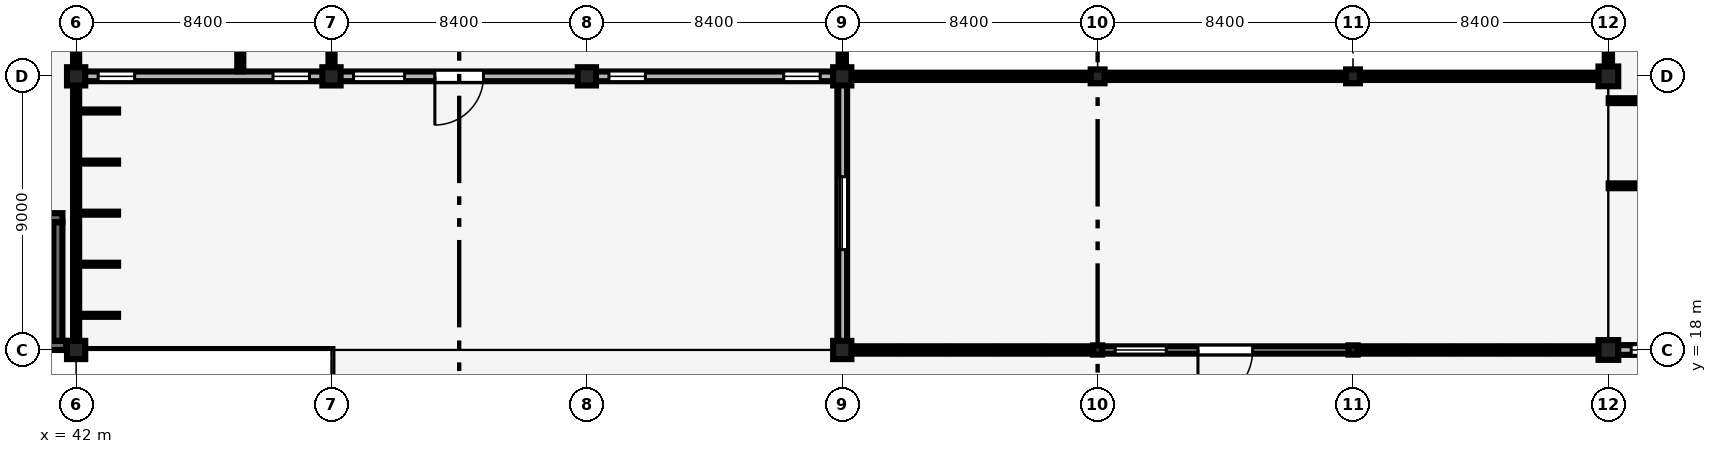
"""IFC4 building model, lengths in metres.
Left out: names, types, materials, properties, quantities, classifications, styles, units other than length and angle.
Written with IfcOpenShell. Run it as: python <this file> out.ifc"""

import sys

from ifc_helpers import new_model, si_unit, direction, frame, frame_2d, origin, origin_2d, place, context, subcontext, project, spatial, rectangle, hollow_rectangle, hollow_circle, extrude, element, fill, save


model = new_model("IFC4")
c1 = context("Model", 3, precision=1e-05, world=origin(), true_north=direction((0.0, 1.0)))
c2 = subcontext(c1, "Body", "Model", "MODEL_VIEW")
j1 = project(units=[si_unit("LENGTHUNIT", "METRE"), si_unit("PLANEANGLEUNIT", "RADIAN")], contexts=[c1])
p1 = place(None, origin())
s1 = spatial("IfcSite", under=j1, at=p1, CompositionType="ELEMENT")
p2 = place(p1, origin())
s2 = spatial("IfcBuilding", under=s1, at=p2, CompositionType="ELEMENT")
p3 = place(p2, frame((0.0, 0.0, 4.8)))
s3 = spatial("IfcBuildingStorey", under=s2, at=p3, CompositionType="ELEMENT", Elevation=4.8)
for number, where, z_axis, x_axis in (
    (1, (42.0, 18.0, 0.0), (0.0, 0.0, 1.0), (1.0, 0.0, 0.0)),
    (2, (42.0, 27.0, 0.0), (0.0, 0.0, 1.0), (1.0, 0.0, 0.0)),
    (3, (50.4, 27.0, 0.0), (0.0, 0.0, 1.0), (1.0, 0.0, 0.0)),
    (4, (58.8, 27.0, 0.0), (0.0, 0.0, 1.0), (1.0, 0.0, 0.0)),
    (5, (67.2, 18.0, 0.0), (0.0, 0.0, 1.0), (1.0, 0.0, 0.0)),
    (6, (67.2, 27.0, 0.0), (0.0, 0.0, 1.0), (1.0, 0.0, 0.0)),
):
    element("IfcColumn", number, at=place(p3, frame(where, z_axis=z_axis, x_axis=x_axis)), inside=s3, PredefinedType="COLUMN", context=c2, shape_type="SweptSolid", body=[
        extrude(rectangle(XDim=0.6, YDim=0.6, at=origin_2d()), origin(), (0.0, 0.0, 1.0), 4.2),
    ])
for number, where, z_axis, x_axis in (
    (7, (75.6, 18.0, 0.0), (0.0, 0.0, 1.0), (1.0, 0.0, 0.0)),
    (8, (84.0, 18.0, 0.0), (0.0, 0.0, 1.0), (1.0, 0.0, 0.0)),
):
    element("IfcColumn", number, at=place(p3, frame(where, z_axis=z_axis, x_axis=x_axis)), inside=s3, PredefinedType="COLUMN", context=c2, shape_type="SweptSolid", body=[
        extrude(hollow_rectangle(XDim=0.305, YDim=0.305, WallThickness=0.012, InnerFilletRadius=0.012, OuterFilletRadius=0.024, at=origin_2d()), origin(), (0.0, 0.0, 1.0), 4.2),
    ])
for number, where, z_axis, x_axis in (
    (9, (92.4, 18.0, 0.0), (0.0, 0.0, 1.0), (1.0, 0.0, 0.0)),
    (10, (92.4, 27.0, 0.0), (0.0, 0.0, 1.0), (1.0, 0.0, 0.0)),
):
    element("IfcColumn", number, at=place(p3, frame(where, z_axis=z_axis, x_axis=x_axis)), inside=s3, PredefinedType="COLUMN", context=c2, shape_type="SweptSolid", body=[
        extrude(rectangle(XDim=0.65, YDim=0.65, at=origin_2d()), origin(), (0.0, 0.0, 1.0), 4.2),
    ])
for number, where, z_axis, x_axis in (
    (11, (75.6, 27.0, 0.0), (0.0, 0.0, 1.0), (1.0, 0.0, 0.0)),
    (12, (84.0, 27.0, 0.0), (0.0, 0.0, 1.0), (1.0, 0.0, 0.0)),
):
    element("IfcColumn", number, at=place(p3, frame(where, z_axis=z_axis, x_axis=x_axis)), inside=s3, PredefinedType="USERDEFINED", context=c2, shape_type="SweptSolid", body=[
        extrude(hollow_circle(Radius=0.229, WallThickness=0.013, at=origin_2d()), origin(), (0.0, 0.0, 1.0), 4.2),
    ])
p4 = place(p3, frame((92.7, 18.0, 0.0), z_axis=(0.0, 0.0, 1.0), x_axis=(1.0, 0.0, 0.0)))
e13 = element("IfcWall", 13, at=p4, inside=s3, PredefinedType="SOLIDWALL", context=c2, shape_type="SweptSolid", body=[
    extrude(rectangle(XDim=7.8, YDim=0.32, at=frame_2d((3.9, 0.0))), origin(), (0.0, 0.0, 1.0), 3.15),
])
p5 = place(p4, frame((4.8, 0.0, 0.0), z_axis=(0.0, 0.0, 1.0), x_axis=(-1.0, 0.0, 0.0)))
e14 = element("IfcOpeningElement", 14, at=p5, cuts=e13, PredefinedType="OPENING", context=c2, shape_type="SweptSolid", body=[
    extrude(rectangle(XDim=1.8, YDim=2.3, at=frame_2d((0.9, 1.15))), frame((0.0, 0.17, 0.0), z_axis=(0.0, -1.0, 0.0), x_axis=(1.0, 0.0, 0.0)), (0.0, 0.0, 1.0), 0.34),
])
p6 = place(p4, frame((0.45, 0.0, 0.95)))
e15 = element("IfcOpeningElement", 15, at=p6, cuts=e13, PredefinedType="OPENING", context=c2, shape_type="SweptSolid", body=[
    extrude(rectangle(XDim=1.68, YDim=1.8, at=frame_2d((0.84, 0.9))), frame((0.0, 0.17, 0.0), z_axis=(0.0, -1.0, 0.0), x_axis=(1.0, 0.0, 0.0)), (0.0, 0.0, 1.0), 0.34),
])
p7 = place(p3, frame((42.275, 27.0, 0.0), z_axis=(0.0, 0.0, 1.0), x_axis=(1.0, 0.0, 0.0)))
e16 = element("IfcWall", 16, at=p7, inside=s3, PredefinedType="SOLIDWALL", context=c2, shape_type="SweptSolid", body=[
    extrude(rectangle(XDim=7.85, YDim=0.32, at=frame_2d((3.925, 0.0))), origin(), (0.0, 0.0, 1.0), 3.13),
])
p8 = place(p7, frame((0.45, 0.0, 0.9)))
e17 = element("IfcOpeningElement", 17, at=p8, cuts=e16, PredefinedType="OPENING", context=c2, shape_type="SweptSolid", body=[
    extrude(rectangle(XDim=1.2, YDim=1.5, at=frame_2d((0.6, 0.75))), frame((0.0, 0.17, 0.0), z_axis=(0.0, -1.0, 0.0), x_axis=(1.0, 0.0, 0.0)), (0.0, 0.0, 1.0), 0.34),
])
p9 = place(p7, frame((6.2, 0.0, 0.9)))
e18 = element("IfcOpeningElement", 18, at=p9, cuts=e16, PredefinedType="OPENING", context=c2, shape_type="SweptSolid", body=[
    extrude(rectangle(XDim=1.2, YDim=1.8, at=frame_2d((0.6, 0.9))), frame((0.0, 0.17, 0.0), z_axis=(0.0, -1.0, 0.0), x_axis=(1.0, 0.0, 0.0)), (0.0, 0.0, 1.0), 0.34),
])
p10 = place(p3, frame((50.675, 27.0, 0.0), z_axis=(0.0, 0.0, 1.0), x_axis=(1.0, 0.0, 0.0)))
e19 = element("IfcWall", 19, at=p10, inside=s3, PredefinedType="SOLIDWALL", context=c2, shape_type="SweptSolid", body=[
    extrude(rectangle(XDim=7.85, YDim=0.32, at=frame_2d((3.925, 0.0))), origin(), (0.0, 0.0, 1.0), 3.08),
])
p11 = place(p10, frame((4.725, 0.0, 0.0), z_axis=(0.0, 0.0, 1.0), x_axis=(-1.0, 0.0, 0.0)))
e20 = element("IfcOpeningElement", 20, at=p11, cuts=e19, PredefinedType="OPENING", context=c2, shape_type="SweptSolid", body=[
    extrude(rectangle(XDim=1.6, YDim=2.3, at=frame_2d((0.8, 1.15))), frame((0.0, 0.17, 0.0), z_axis=(0.0, -1.0, 0.0), x_axis=(1.0, 0.0, 0.0)), (0.0, 0.0, 1.0), 0.34),
])
p12 = place(p10, frame((0.45, 0.0, 0.95)))
e21 = element("IfcOpeningElement", 21, at=p12, cuts=e19, PredefinedType="OPENING", context=c2, shape_type="SweptSolid", body=[
    extrude(rectangle(XDim=1.68, YDim=1.8, at=frame_2d((0.84, 0.9))), frame((0.0, 0.17, 0.0), z_axis=(0.0, -1.0, 0.0), x_axis=(1.0, 0.0, 0.0)), (0.0, 0.0, 1.0), 0.34),
])
p13 = place(p3, frame((59.075, 27.0, 0.0), z_axis=(0.0, 0.0, 1.0), x_axis=(1.0, 0.0, 0.0)))
e22 = element("IfcWall", 22, at=p13, inside=s3, PredefinedType="SOLIDWALL", context=c2, shape_type="SweptSolid", body=[
    extrude(rectangle(XDim=7.85, YDim=0.32, at=frame_2d((3.925, 0.0))), origin(), (0.0, 0.0, 1.0), 3.13),
])
p14 = place(p13, frame((0.45, 0.0, 0.9)))
e23 = element("IfcOpeningElement", 23, at=p14, cuts=e22, PredefinedType="OPENING", context=c2, shape_type="SweptSolid", body=[
    extrude(rectangle(XDim=1.2, YDim=1.5, at=frame_2d((0.6, 0.75))), frame((0.0, 0.17, 0.0), z_axis=(0.0, -1.0, 0.0), x_axis=(1.0, 0.0, 0.0)), (0.0, 0.0, 1.0), 0.34),
])
p15 = place(p13, frame((6.2, 0.0, 0.9)))
e24 = element("IfcOpeningElement", 24, at=p15, cuts=e22, PredefinedType="OPENING", context=c2, shape_type="SweptSolid", body=[
    extrude(rectangle(XDim=1.2, YDim=1.8, at=frame_2d((0.6, 0.9))), frame((0.0, 0.17, 0.0), z_axis=(0.0, -1.0, 0.0), x_axis=(1.0, 0.0, 0.0)), (0.0, 0.0, 1.0), 0.34),
])
p16 = place(p3, frame((67.2, 18.275, 0.0), z_axis=(0.0, 0.0, 1.0), x_axis=(0.0, 1.0, 0.0)))
e25 = element("IfcWall", 25, at=p16, inside=s3, PredefinedType="SOLIDWALL", context=c2, shape_type="SweptSolid", body=[
    extrude(rectangle(XDim=8.45, YDim=0.32, at=frame_2d((4.225, 0.0))), origin(), (0.0, 0.0, 1.0), 3.43),
])
p17 = place(p16, frame((3.025, 0.0, 0.9)))
e26 = element("IfcOpeningElement", 26, at=p17, cuts=e25, PredefinedType="OPENING", context=c2, shape_type="SweptSolid", body=[
    extrude(rectangle(XDim=2.4, YDim=1.8, at=frame_2d((1.2, 0.9))), frame((0.0, 0.17, 0.0), z_axis=(0.0, -1.0, 0.0), x_axis=(1.0, 0.0, 0.0)), (0.0, 0.0, 1.0), 0.34),
])
p18 = place(p3, frame((67.475, 18.0, 0.0), z_axis=(0.0, 0.0, 1.0), x_axis=(1.0, 0.0, 0.0)))
e27 = element("IfcWall", 27, at=p18, inside=s3, PredefinedType="SOLIDWALL", context=c2, shape_type="SweptSolid", body=[
    extrude(rectangle(XDim=7.998, YDim=0.24, at=frame_2d((3.999, 0.0))), origin(), (0.0, 0.0, 1.0), 1.1),
])
p19 = place(p3, frame((75.727, 18.0, 0.0), z_axis=(0.0, 0.0, 1.0), x_axis=(1.0, 0.0, 0.0)))
e28 = element("IfcWall", 28, at=p19, inside=s3, PredefinedType="SOLIDWALL", context=c2, shape_type="SweptSolid", body=[
    extrude(rectangle(XDim=8.145, YDim=0.24, at=frame_2d((4.073, 0.0))), origin(), (0.0, 0.0, 1.0), 3.296),
])
p20 = place(p19, frame((4.973, 0.0, 0.0), z_axis=(0.0, 0.0, 1.0), x_axis=(-1.0, 0.0, 0.0)))
e29 = element("IfcOpeningElement", 29, at=p20, cuts=e28, PredefinedType="OPENING", context=c2, shape_type="SweptSolid", body=[
    extrude(rectangle(XDim=1.8, YDim=2.3, at=frame_2d((0.9, 1.15))), frame((0.0, 0.13, 0.0), z_axis=(0.0, -1.0, 0.0), x_axis=(1.0, 0.0, 0.0)), (0.0, 0.0, 1.0), 0.26),
])
p21 = place(p19, frame((0.45, 0.0, 0.95)))
e30 = element("IfcOpeningElement", 30, at=p21, cuts=e28, PredefinedType="OPENING", context=c2, shape_type="SweptSolid", body=[
    extrude(rectangle(XDim=1.68, YDim=1.8, at=frame_2d((0.84, 0.9))), frame((0.0, 0.13, 0.0), z_axis=(0.0, -1.0, 0.0), x_axis=(1.0, 0.0, 0.0)), (0.0, 0.0, 1.0), 0.26),
])
p22 = place(p3, frame((84.127, 18.0, 0.0), z_axis=(0.0, 0.0, 1.0), x_axis=(1.0, 0.0, 0.0)))
e31 = element("IfcWall", 31, at=p22, inside=s3, PredefinedType="SOLIDWALL", context=c2, shape_type="SweptSolid", body=[
    extrude(rectangle(XDim=7.973, YDim=0.24, at=frame_2d((3.986, 0.0))), origin(), (0.0, 0.0, 1.0), 1.1),
])
p23 = place(p3, frame((67.2, 27.275, 0.0), z_axis=(0.0, 0.0, 1.0), x_axis=(0.0, 1.0, 0.0)))
e32 = element("IfcWall", 32, at=p23, inside=s3, PredefinedType="SOLIDWALL", context=c2, shape_type="SweptSolid", body=[
    extrude(rectangle(XDim=7.85, YDim=0.24, at=frame_2d((3.925, 0.0))), origin(), (0.0, 0.0, 1.0), 1.15),
])
p24 = place(p3, frame((92.4, 27.3, 0.0), z_axis=(0.0, 0.0, 1.0), x_axis=(0.0, 1.0, 0.0)))
e33 = element("IfcWall", 33, at=p24, inside=s3, PredefinedType="SOLIDWALL", context=c2, shape_type="SweptSolid", body=[
    extrude(rectangle(XDim=7.8, YDim=0.24, at=frame_2d((3.9, 0.0))), origin(), (0.0, 0.0, 1.0), 1.15),
])
p25 = place(p3, frame((67.475, 27.0, 0.0), z_axis=(0.0, 0.0, 1.0), x_axis=(1.0, 0.0, 0.0)))
e34 = element("IfcWall", 34, at=p25, inside=s3, PredefinedType="SOLIDWALL", context=c2, shape_type="SweptSolid", body=[
    extrude(rectangle(XDim=7.921, YDim=0.24, at=frame_2d((3.961, 0.0))), origin(), (0.0, 0.0, 1.0), 1.1),
])
p26 = place(p3, frame((75.804, 27.0, 0.0), z_axis=(0.0, 0.0, 1.0), x_axis=(1.0, 0.0, 0.0)))
e35 = element("IfcWall", 35, at=p26, inside=s3, PredefinedType="SOLIDWALL", context=c2, shape_type="SweptSolid", body=[
    extrude(rectangle(XDim=7.993, YDim=0.24, at=frame_2d((3.996, 0.0))), origin(), (0.0, 0.0, 1.0), 1.1),
])
p27 = place(p3, frame((84.204, 27.0, 0.0), z_axis=(0.0, 0.0, 1.0), x_axis=(1.0, 0.0, 0.0)))
e36 = element("IfcWall", 36, at=p27, inside=s3, PredefinedType="SOLIDWALL", context=c2, shape_type="SweptSolid", body=[
    extrude(rectangle(XDim=7.896, YDim=0.24, at=frame_2d((3.948, 0.0))), origin(), (0.0, 0.0, 1.0), 1.1),
])
p28 = place(p3, frame((33.925, 18.15, 0.0), z_axis=(0.0, 0.0, 1.0), x_axis=(1.0, 0.0, 0.0)))
e37 = element("IfcWall", 37, at=p28, inside=s3, PredefinedType="SHEAR", context=c2, shape_type="SweptSolid", body=[
    extrude(rectangle(XDim=7.75, YDim=0.3, at=frame_2d((3.875, 0.0))), origin(), (0.0, 0.0, 1.0), 4.025),
])
p29 = place(p3, frame((34.05, 22.35, 0.0), z_axis=(0.0, 0.0, 1.0), x_axis=(1.0, 0.0, 0.0)))
e38 = element("IfcWall", 38, at=p29, inside=s3, PredefinedType="SHEAR", context=c2, shape_type="SweptSolid", body=[
    extrude(rectangle(XDim=7.5, YDim=0.3, at=frame_2d((3.75, 0.0))), origin(), (0.0, 0.0, 1.0), 4.025),
])
p30 = place(p29, frame((0.3, 0.0, 0.0)))
e39 = element("IfcOpeningElement", 39, at=p30, cuts=e38, PredefinedType="OPENING", context=c2, shape_type="SweptSolid", body=[
    extrude(rectangle(XDim=1.5, YDim=2.2, at=frame_2d((0.75, 1.1))), frame((0.0, 0.16, 0.0), z_axis=(0.0, -1.0, 0.0), x_axis=(1.0, 0.0, 0.0)), (0.0, 0.0, 1.0), 0.32),
])
p31 = place(p3, frame((41.4, 18.3, 0.0), z_axis=(0.0, 0.0, 1.0), x_axis=(0.0, 1.0, 0.0)))
e40 = element("IfcWall", 40, at=p31, inside=s3, PredefinedType="SHEAR", context=c2, shape_type="SweptSolid", body=[
    extrude(rectangle(XDim=3.9, YDim=0.3, at=frame_2d((1.95, 0.0))), origin(), (0.0, 0.0, 1.0), 4.025),
])
p32 = place(p3, frame((47.4, 27.165, 0.0), z_axis=(0.0, 0.0, 1.0), x_axis=(0.0, 1.0, 0.0)))
e41 = element("IfcWall", 41, at=p32, inside=s3, PredefinedType="PARTITIONING", context=c2, shape_type="SweptSolid", body=[
    extrude(rectangle(XDim=58.625, YDim=0.2, at=frame_2d((29.312, 0.0))), origin(), (0.0, 0.0, 1.0), 3.9),
])
p33 = place(p32, frame((0.685, 0.0, 0.0)))
e42 = element("IfcOpeningElement", 42, at=p33, cuts=e41, PredefinedType="OPENING", context=c2, shape_type="SweptSolid", body=[
    extrude(rectangle(XDim=1.5, YDim=2.2, at=frame_2d((0.75, 1.1))), frame((0.0, 0.11, 0.0), z_axis=(0.0, -1.0, 0.0), x_axis=(1.0, 0.0, 0.0)), (0.0, 0.0, 1.0), 0.22),
])
p34 = place(p32, frame((4.935, 0.0, 0.0)))
e43 = element("IfcOpeningElement", 43, at=p34, cuts=e41, PredefinedType="OPENING", context=c2, shape_type="SweptSolid", body=[
    extrude(rectangle(XDim=1.0, YDim=2.15, at=frame_2d((0.5, 1.075))), frame((0.0, 0.11, 0.0), z_axis=(0.0, -1.0, 0.0), x_axis=(1.0, 0.0, 0.0)), (0.0, 0.0, 1.0), 0.22),
])
p35 = place(p32, frame((11.935, 0.0, 0.0)))
e44 = element("IfcOpeningElement", 44, at=p35, cuts=e41, PredefinedType="OPENING", context=c2, shape_type="SweptSolid", body=[
    extrude(rectangle(XDim=1.0, YDim=2.15, at=frame_2d((0.5, 1.075))), frame((0.0, 0.11, 0.0), z_axis=(0.0, -1.0, 0.0), x_axis=(1.0, 0.0, 0.0)), (0.0, 0.0, 1.0), 0.22),
])
p36 = place(p32, frame((20.335, 0.0, 0.0)))
e45 = element("IfcOpeningElement", 45, at=p36, cuts=e41, PredefinedType="OPENING", context=c2, shape_type="SweptSolid", body=[
    extrude(rectangle(XDim=1.0, YDim=2.15, at=frame_2d((0.5, 1.075))), frame((0.0, 0.11, 0.0), z_axis=(0.0, -1.0, 0.0), x_axis=(1.0, 0.0, 0.0)), (0.0, 0.0, 1.0), 0.22),
])
p37 = place(p32, frame((27.36, 0.0, 0.0)))
e46 = element("IfcOpeningElement", 46, at=p37, cuts=e41, PredefinedType="OPENING", context=c2, shape_type="SweptSolid", body=[
    extrude(rectangle(XDim=0.95, YDim=2.2, at=frame_2d((0.475, 1.1))), frame((0.0, 0.11, 0.0), z_axis=(0.0, -1.0, 0.0), x_axis=(1.0, 0.0, 0.0)), (0.0, 0.0, 1.0), 0.22),
])
p38 = place(p32, frame((32.96, 0.0, 0.0)))
e47 = element("IfcOpeningElement", 47, at=p38, cuts=e41, PredefinedType="OPENING", context=c2, shape_type="SweptSolid", body=[
    extrude(rectangle(XDim=0.95, YDim=2.2, at=frame_2d((0.475, 1.1))), frame((0.0, 0.11, 0.0), z_axis=(0.0, -1.0, 0.0), x_axis=(1.0, 0.0, 0.0)), (0.0, 0.0, 1.0), 0.22),
])
p39 = place(p32, frame((38.56, 0.0, 0.0)))
e48 = element("IfcOpeningElement", 48, at=p39, cuts=e41, PredefinedType="OPENING", context=c2, shape_type="SweptSolid", body=[
    extrude(rectangle(XDim=0.95, YDim=2.1, at=frame_2d((0.475, 1.05))), frame((0.0, 0.11, 0.0), z_axis=(0.0, -1.0, 0.0), x_axis=(1.0, 0.0, 0.0)), (0.0, 0.0, 1.0), 0.22),
])
p40 = place(p32, frame((45.535, 0.0, 0.0)))
e49 = element("IfcOpeningElement", 49, at=p40, cuts=e41, PredefinedType="OPENING", context=c2, shape_type="SweptSolid", body=[
    extrude(rectangle(XDim=1.0, YDim=2.15, at=frame_2d((0.5, 1.075))), frame((0.0, 0.11, 0.0), z_axis=(0.0, -1.0, 0.0), x_axis=(1.0, 0.0, 0.0)), (0.0, 0.0, 1.0), 0.22),
])
p41 = place(p32, frame((53.935, 0.0, 0.0)))
e50 = element("IfcOpeningElement", 50, at=p41, cuts=e41, PredefinedType="OPENING", context=c2, shape_type="SweptSolid", body=[
    extrude(rectangle(XDim=1.0, YDim=2.15, at=frame_2d((0.5, 1.075))), frame((0.0, 0.11, 0.0), z_axis=(0.0, -1.0, 0.0), x_axis=(1.0, 0.0, 0.0)), (0.0, 0.0, 1.0), 0.22),
])
p42 = place(p3, frame((42.0, 27.165, 0.0), z_axis=(0.0, 0.0, 1.0), x_axis=(0.0, 1.0, 0.0)))
e51 = element("IfcWall", 51, at=p42, inside=s3, PredefinedType="PARTITIONING", context=c2, shape_type="SweptSolid", body=[
    extrude(rectangle(XDim=7.925, YDim=0.2, at=frame_2d((3.962, 0.0))), origin(), (0.0, 0.0, 1.0), 3.272),
])
p43 = place(p42, frame((0.685, 0.0, 0.0)))
e52 = element("IfcOpeningElement", 52, at=p43, cuts=e51, PredefinedType="OPENING", context=c2, shape_type="SweptSolid", body=[
    extrude(rectangle(XDim=1.5, YDim=2.2, at=frame_2d((0.75, 1.1))), frame((0.0, 0.11, 0.0), z_axis=(0.0, -1.0, 0.0), x_axis=(1.0, 0.0, 0.0)), (0.0, 0.0, 1.0), 0.22),
])
p44 = place(p42, frame((4.935, 0.0, 0.0)))
e53 = element("IfcOpeningElement", 53, at=p44, cuts=e51, PredefinedType="OPENING", context=c2, shape_type="SweptSolid", body=[
    extrude(rectangle(XDim=1.0, YDim=2.15, at=frame_2d((0.5, 1.075))), frame((0.0, 0.11, 0.0), z_axis=(0.0, -1.0, 0.0), x_axis=(1.0, 0.0, 0.0)), (0.0, 0.0, 1.0), 0.22),
])
p45 = place(p3, frame((50.4, 27.165, 0.0), z_axis=(0.0, 0.0, 1.0), x_axis=(0.0, 1.0, 0.0)))
e54 = element("IfcWall", 54, at=p45, inside=s3, PredefinedType="PARTITIONING", context=c2, shape_type="SweptSolid", body=[
    extrude(rectangle(XDim=7.925, YDim=0.2, at=frame_2d((3.962, 0.0))), origin(), (0.0, 0.0, 1.0), 3.03),
])
p46 = place(p45, frame((3.535, 0.0, 0.0)))
e55 = element("IfcOpeningElement", 55, at=p46, cuts=e54, PredefinedType="OPENING", context=c2, shape_type="SweptSolid", body=[
    extrude(rectangle(XDim=1.0, YDim=2.15, at=frame_2d((0.5, 1.075))), frame((0.0, 0.11, 0.0), z_axis=(0.0, -1.0, 0.0), x_axis=(1.0, 0.0, 0.0)), (0.0, 0.0, 1.0), 0.22),
])
for number, where, z_axis, x_axis in (
    (56, (92.41, 23.4, 0.0), (0.0, 0.0, 1.0), (1.0, 0.0, 0.0)),
    (57, (92.41, 26.2, 0.0), (0.0, 0.0, 1.0), (1.0, 0.0, 0.0)),
):
    element("IfcWall", number, at=place(p3, frame(where, z_axis=z_axis, x_axis=x_axis)), inside=s3, PredefinedType="PARTITIONING", context=c2, shape_type="SweptSolid", body=[
        extrude(rectangle(XDim=5.685, YDim=0.16, at=frame_2d((2.843, 0.0))), origin(), (0.0, 0.0, 1.0), 3.9),
    ])
p47 = place(p6, origin())
e58 = element("IfcWindow", 58, at=p47, inside=s3, PartitioningType="SINGLE_PANEL", PredefinedType="WINDOW", context=c2, shape_type="SweptSolid", body=[
    extrude(rectangle(XDim=1.68, YDim=1.8, at=frame_2d((0.84, 0.9))), frame((0.0, 0.03, 0.0), z_axis=(0.0, -1.0, 0.0), x_axis=(1.0, 0.0, 0.0)), (0.0, 0.0, 1.0), 0.06),
])
fill(e15, e58)
p48 = place(p8, origin())
e59 = element("IfcWindow", 59, at=p48, inside=s3, PartitioningType="SINGLE_PANEL", PredefinedType="WINDOW", context=c2, shape_type="SweptSolid", body=[
    extrude(rectangle(XDim=1.2, YDim=1.5, at=frame_2d((0.6, 0.75))), frame((0.0, 0.03, 0.0), z_axis=(0.0, -1.0, 0.0), x_axis=(1.0, 0.0, 0.0)), (0.0, 0.0, 1.0), 0.06),
])
fill(e17, e59)
p49 = place(p9, origin())
e60 = element("IfcWindow", 60, at=p49, inside=s3, PartitioningType="SINGLE_PANEL", PredefinedType="WINDOW", context=c2, shape_type="SweptSolid", body=[
    extrude(rectangle(XDim=1.2, YDim=1.8, at=frame_2d((0.6, 0.9))), frame((0.0, 0.03, 0.0), z_axis=(0.0, -1.0, 0.0), x_axis=(1.0, 0.0, 0.0)), (0.0, 0.0, 1.0), 0.06),
])
fill(e18, e60)
p50 = place(p11, origin())
e61 = element("IfcDoor", 61, at=p50, inside=s3, OperationType="DOUBLE_DOOR_SINGLE_SWING", PredefinedType="DOOR", context=c2, shape_type="SweptSolid", body=[
    extrude(rectangle(XDim=1.6, YDim=2.3, at=frame_2d((0.8, 1.15))), frame((0.0, 0.025, 0.0), z_axis=(0.0, -1.0, 0.0), x_axis=(1.0, 0.0, 0.0)), (0.0, 0.0, 1.0), 0.05),
])
fill(e20, e61)
p51 = place(p12, origin())
e62 = element("IfcWindow", 62, at=p51, inside=s3, PartitioningType="SINGLE_PANEL", PredefinedType="WINDOW", context=c2, shape_type="SweptSolid", body=[
    extrude(rectangle(XDim=1.68, YDim=1.8, at=frame_2d((0.84, 0.9))), frame((0.0, 0.03, 0.0), z_axis=(0.0, -1.0, 0.0), x_axis=(1.0, 0.0, 0.0)), (0.0, 0.0, 1.0), 0.06),
])
fill(e21, e62)
p52 = place(p14, origin())
e63 = element("IfcWindow", 63, at=p52, inside=s3, PartitioningType="SINGLE_PANEL", PredefinedType="WINDOW", context=c2, shape_type="SweptSolid", body=[
    extrude(rectangle(XDim=1.2, YDim=1.5, at=frame_2d((0.6, 0.75))), frame((0.0, 0.03, 0.0), z_axis=(0.0, -1.0, 0.0), x_axis=(1.0, 0.0, 0.0)), (0.0, 0.0, 1.0), 0.06),
])
fill(e23, e63)
p53 = place(p15, origin())
e64 = element("IfcWindow", 64, at=p53, inside=s3, PartitioningType="SINGLE_PANEL", PredefinedType="WINDOW", context=c2, shape_type="SweptSolid", body=[
    extrude(rectangle(XDim=1.2, YDim=1.8, at=frame_2d((0.6, 0.9))), frame((0.0, 0.03, 0.0), z_axis=(0.0, -1.0, 0.0), x_axis=(1.0, 0.0, 0.0)), (0.0, 0.0, 1.0), 0.06),
])
fill(e24, e64)
p54 = place(p17, origin())
e65 = element("IfcWindow", 65, at=p54, inside=s3, PartitioningType="SINGLE_PANEL", PredefinedType="WINDOW", context=c2, shape_type="SweptSolid", body=[
    extrude(rectangle(XDim=2.4, YDim=1.8, at=frame_2d((1.2, 0.9))), frame((0.0, 0.03, 0.0), z_axis=(0.0, -1.0, 0.0), x_axis=(1.0, 0.0, 0.0)), (0.0, 0.0, 1.0), 0.06),
])
fill(e26, e65)
p55 = place(p20, origin())
e66 = element("IfcDoor", 66, at=p55, inside=s3, OperationType="DOUBLE_DOOR_SINGLE_SWING", PredefinedType="DOOR", context=c2, shape_type="SweptSolid", body=[
    extrude(rectangle(XDim=1.8, YDim=2.3, at=frame_2d((0.9, 1.15))), frame((0.0, 0.025, 0.0), z_axis=(0.0, -1.0, 0.0), x_axis=(1.0, 0.0, 0.0)), (0.0, 0.0, 1.0), 0.05),
])
fill(e29, e66)
p56 = place(p21, origin())
e67 = element("IfcWindow", 67, at=p56, inside=s3, PartitioningType="SINGLE_PANEL", PredefinedType="WINDOW", context=c2, shape_type="SweptSolid", body=[
    extrude(rectangle(XDim=1.68, YDim=1.8, at=frame_2d((0.84, 0.9))), frame((0.0, 0.03, 0.0), z_axis=(0.0, -1.0, 0.0), x_axis=(1.0, 0.0, 0.0)), (0.0, 0.0, 1.0), 0.06),
])
fill(e30, e67)
save(model, sys.argv[1])
